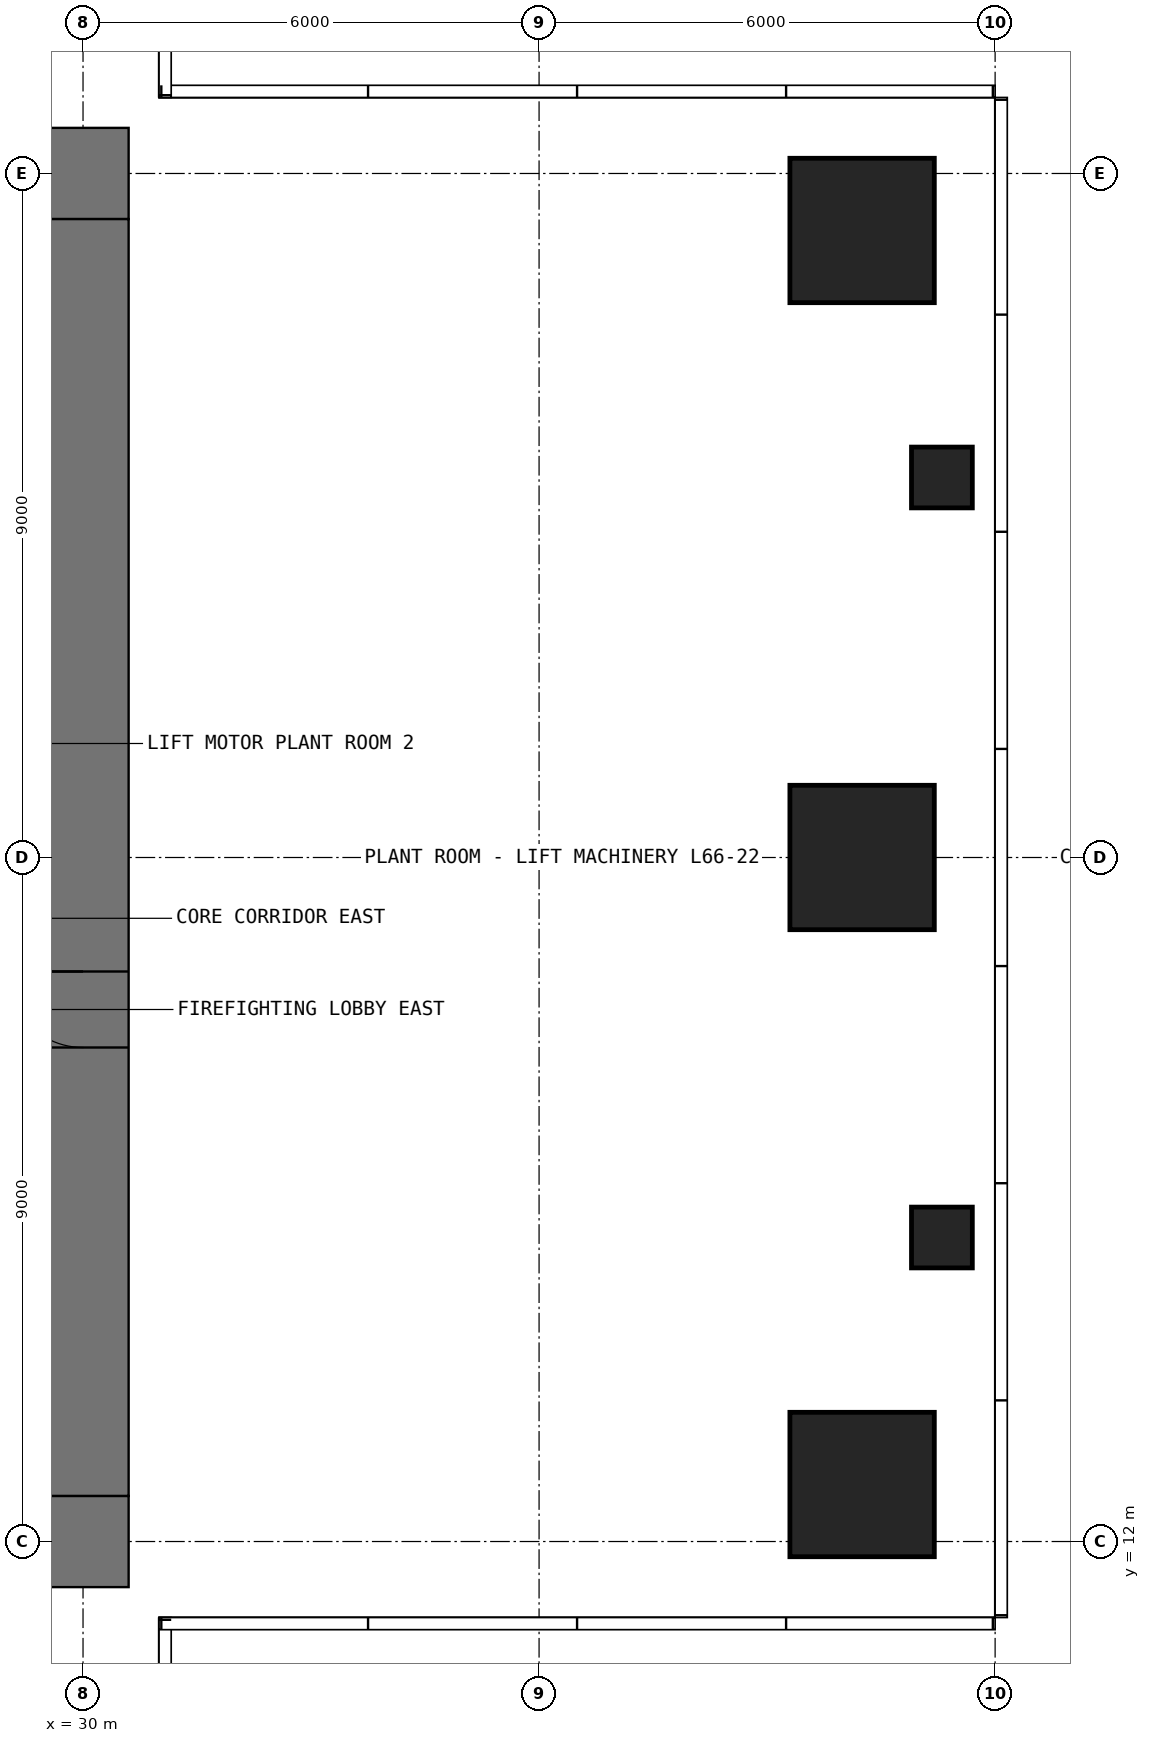
"""IFC4 building model, lengths in metres.
Left out: names, types, materials, properties, quantities, classifications, styles, units other than length and angle.
Written with IfcOpenShell. Run it as: python <this file> out.ifc"""

import sys

from ifc_helpers import new_model, si_unit, direction, frame, frame_2d, origin, origin_2d, place, context, subcontext, project, spatial, rectangle, extrude, element, fill, save


model = new_model("IFC4")
c1 = context("Model", 3, precision=1e-05, world=origin(), true_north=direction((0.0, 1.0)))
c2 = subcontext(c1, "Body", "Model", "MODEL_VIEW")
j1 = project(units=[si_unit("LENGTHUNIT", "METRE"), si_unit("PLANEANGLEUNIT", "RADIAN")], contexts=[c1])
p1 = place(None, origin())
s1 = spatial("IfcSite", under=j1, at=p1, CompositionType="ELEMENT")
p2 = place(p1, origin())
s2 = spatial("IfcBuilding", under=s1, at=p2, CompositionType="ELEMENT")
p3 = place(p2, frame((0.0, 0.0, 277.9)))
s3 = spatial("IfcBuildingStorey", under=s2, at=p3, CompositionType="ELEMENT", Elevation=277.9)
p4 = place(p3, frame((40.25, 12.75, 0.0), z_axis=(0.0, 0.0, 1.0), x_axis=(1.0, 0.0, 0.0)))
e1 = element("IfcColumn", 1, at=p4, inside=s3, PredefinedType="COLUMN", context=c2, shape_type="SweptSolid", body=[
    extrude(rectangle(XDim=1.9, YDim=1.9, at=origin_2d()), origin(), (0.0, 0.0, 1.0), 6.0),
])
p5 = place(p3, frame((41.3, 16.0, 0.0), z_axis=(0.0, 0.0, 1.0), x_axis=(1.0, 0.0, 0.0)))
e2 = element("IfcColumn", 2, at=p5, inside=s3, PredefinedType="COLUMN", context=c2, shape_type="SweptSolid", body=[
    extrude(rectangle(XDim=0.8, YDim=0.8, at=origin_2d()), origin(), (0.0, 0.0, 1.0), 6.0),
])
p6 = place(p3, frame((40.25, 21.0, 0.0), z_axis=(0.0, 0.0, 1.0), x_axis=(1.0, 0.0, 0.0)))
e3 = element("IfcColumn", 3, at=p6, inside=s3, PredefinedType="COLUMN", context=c2, shape_type="SweptSolid", body=[
    extrude(rectangle(XDim=1.9, YDim=1.9, at=origin_2d()), origin(), (0.0, 0.0, 1.0), 6.0),
])
p7 = place(p3, frame((41.3, 26.0, 0.0), z_axis=(0.0, 0.0, 1.0), x_axis=(1.0, 0.0, 0.0)))
e4 = element("IfcColumn", 4, at=p7, inside=s3, PredefinedType="COLUMN", context=c2, shape_type="SweptSolid", body=[
    extrude(rectangle(XDim=0.8, YDim=0.8, at=origin_2d()), origin(), (0.0, 0.0, 1.0), 6.0),
])
p8 = place(p3, frame((40.25, 29.25, 0.0), z_axis=(0.0, 0.0, 1.0), x_axis=(1.0, 0.0, 0.0)))
e5 = element("IfcColumn", 5, at=p8, inside=s3, PredefinedType="COLUMN", context=c2, shape_type="SweptSolid", body=[
    extrude(rectangle(XDim=1.9, YDim=1.9, at=origin_2d()), origin(), (0.0, 0.0, 1.0), 6.0),
])
p9 = place(p3, frame((11.4, 12.0, -0.1), z_axis=(0.0, 0.0, 1.0), x_axis=(1.0, 0.0, 0.0)))
e6 = element("IfcWall", 6, at=p9, inside=s3, PredefinedType="SHEAR", context=c2, shape_type="SweptSolid", body=[
    extrude(rectangle(XDim=19.2, YDim=1.2, at=frame_2d((9.6, 0.0))), origin(), (0.0, 0.0, 1.0), 6.0),
])
p10 = place(p9, frame((8.7, 0.0, 0.1)))
e7 = element("IfcOpeningElement", 7, at=p10, cuts=e6, PredefinedType="OPENING", context=c2, shape_type="SweptSolid", body=[
    extrude(rectangle(XDim=1.8, YDim=2.4, at=frame_2d((0.9, 1.2))), frame((0.0, 0.61, 0.0), z_axis=(0.0, -1.0, 0.0), x_axis=(1.0, 0.0, 0.0)), (0.0, 0.0, 1.0), 1.22),
])
p11 = place(p3, frame((11.4, 30.0, -0.1), z_axis=(0.0, 0.0, 1.0), x_axis=(1.0, 0.0, 0.0)))
e8 = element("IfcWall", 8, at=p11, inside=s3, PredefinedType="SHEAR", context=c2, shape_type="SweptSolid", body=[
    extrude(rectangle(XDim=19.2, YDim=1.2, at=frame_2d((9.6, 0.0))), origin(), (0.0, 0.0, 1.0), 6.0),
])
p12 = place(p11, frame((8.7, 0.0, 0.1)))
e9 = element("IfcOpeningElement", 9, at=p12, cuts=e8, PredefinedType="OPENING", context=c2, shape_type="SweptSolid", body=[
    extrude(rectangle(XDim=1.8, YDim=2.4, at=frame_2d((0.9, 1.2))), frame((0.0, 0.61, 0.0), z_axis=(0.0, -1.0, 0.0), x_axis=(1.0, 0.0, 0.0)), (0.0, 0.0, 1.0), 1.22),
])
p13 = place(p3, frame((30.0, 12.6, -0.1), z_axis=(0.0, 0.0, 1.0), x_axis=(0.0, 1.0, 0.0)))
e10 = element("IfcWall", 10, at=p13, inside=s3, PredefinedType="SHEAR", context=c2, shape_type="SweptSolid", body=[
    extrude(rectangle(XDim=16.8, YDim=1.2, at=frame_2d((8.4, 0.0))), origin(), (0.0, 0.0, 1.0), 6.0),
])
p14 = place(p13, frame((5.9, 0.0, 0.1)))
e11 = element("IfcOpeningElement", 11, at=p14, cuts=e10, PredefinedType="OPENING", context=c2, shape_type="SweptSolid", body=[
    extrude(rectangle(XDim=1.0, YDim=2.2, at=frame_2d((0.5, 1.1))), frame((0.0, 0.61, 0.0), z_axis=(0.0, -1.0, 0.0), x_axis=(1.0, 0.0, 0.0)), (0.0, 0.0, 1.0), 1.22),
])
p15 = place(p14, origin())
e12 = element("IfcDoor", 12, at=p15, inside=s3, OperationType="SINGLE_SWING_RIGHT", PredefinedType="DOOR", context=c2, shape_type="SweptSolid", body=[
    extrude(rectangle(XDim=1.0, YDim=2.2, at=frame_2d((0.5, 1.1))), frame((0.0, -0.275, 0.0), z_axis=(0.0, -1.0, 0.0), x_axis=(1.0, 0.0, 0.0)), (0.0, 0.0, 1.0), 0.05),
])
fill(e11, e12)
save(model, sys.argv[1])
